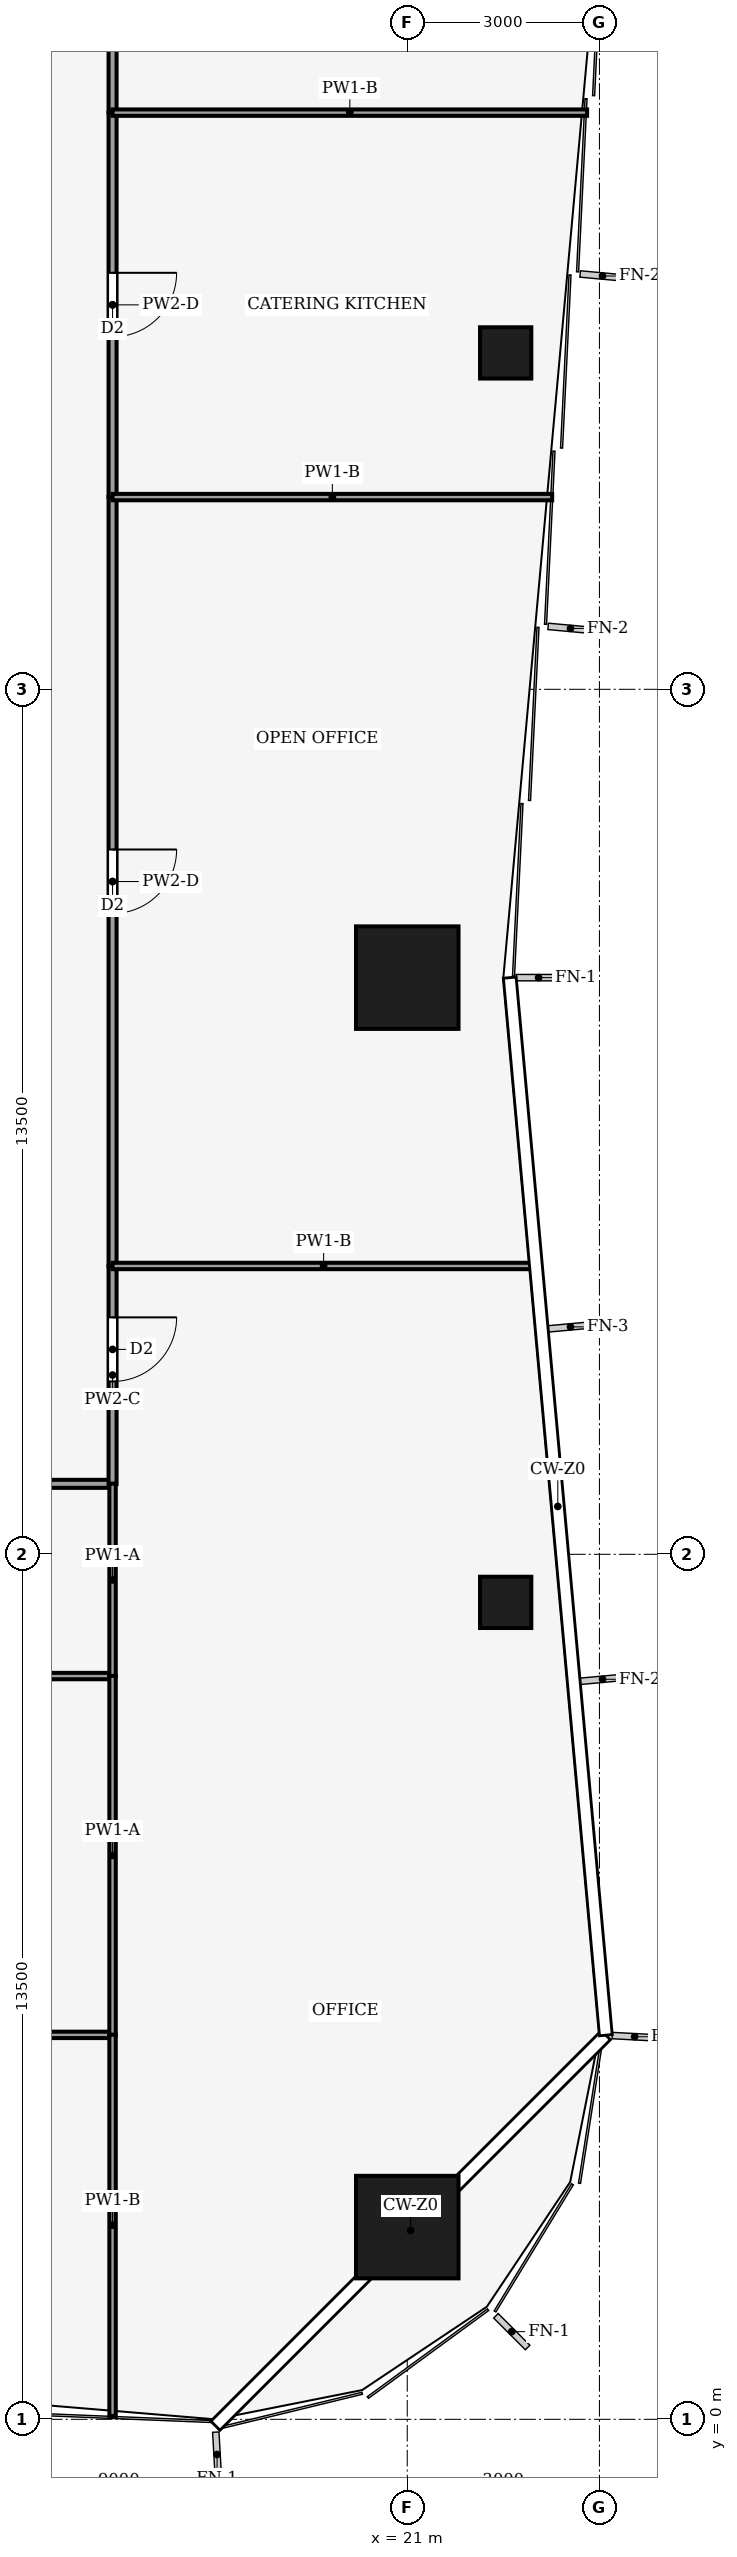
"""IFC4 building model, lengths in metres.
Left out: names, types, materials, properties, quantities, classifications, styles, units other than length and angle.
Written with IfcOpenShell. Run it as: python <this file> out.ifc"""

import sys

from ifc_helpers import new_model, si_unit, direction, frame, frame_2d, origin, origin_2d, place, context, subcontext, project, spatial, rectangle, hollow_rectangle, extrude, element, fill, save


model = new_model("IFC4")
c1 = context("Model", 3, precision=1e-05, world=origin(), true_north=direction((0.0, 1.0)))
c2 = subcontext(c1, "Body", "Model", "MODEL_VIEW")
j1 = project(units=[si_unit("LENGTHUNIT", "METRE"), si_unit("PLANEANGLEUNIT", "RADIAN")], contexts=[c1])
p1 = place(None, origin())
s1 = spatial("IfcSite", under=j1, at=p1, CompositionType="ELEMENT")
p2 = place(p1, origin())
s2 = spatial("IfcBuilding", under=s1, at=p2, CompositionType="ELEMENT")
p3 = place(p2, frame((0.0, 0.0, 9.0)))
s3 = spatial("IfcBuildingStorey", under=s2, at=p3, CompositionType="ELEMENT", Elevation=9.0)
for number, where, z_axis, x_axis in (
    (1, (21.0, 22.5, 0.0), (0.0, 0.0, 1.0), (1.0, 0.0, 0.0)),
    (2, (21.0, 3.0, 0.0), (0.0, 0.0, 1.0), (1.0, 0.0, 0.0)),
):
    element("IfcColumn", number, at=place(p3, frame(where, z_axis=z_axis, x_axis=x_axis)), inside=s3, PredefinedType="COLUMN", context=c2, shape_type="SweptSolid", body=[
        extrude(hollow_rectangle(XDim=1.6, YDim=1.6, WallThickness=0.09, at=origin_2d()), origin(), (0.0, 0.0, 1.0), 5.0),
    ])
for number, where, z_axis, x_axis in (
    (3, (22.536, 12.75, 0.0), (0.0, 0.0, 1.0), (1.0, 0.0, 0.0)),
    (4, (22.536, 32.25, 0.0), (0.0, 0.0, 1.0), (1.0, 0.0, 0.0)),
):
    element("IfcColumn", number, at=place(p3, frame(where, z_axis=z_axis, x_axis=x_axis)), inside=s3, PredefinedType="COLUMN", context=c2, shape_type="SweptSolid", body=[
        extrude(hollow_rectangle(XDim=0.8, YDim=0.8, WallThickness=0.04, at=origin_2d()), origin(), (0.0, 0.0, 1.0), 5.0),
    ])
p4 = place(p3, frame((16.4, 14.6, 0.0), z_axis=(0.0, 0.0, 1.0), x_axis=(-1.0, 0.0, 0.0)))
e5 = element("IfcWall", 5, at=p4, inside=s3, PredefinedType="PARTITIONING", context=c2, shape_type="SweptSolid", body=[
    extrude(rectangle(XDim=4.4, YDim=0.125, at=frame_2d((2.2, 0.0))), origin(), (0.0, 0.0, 1.0), 4.29),
])
p5 = place(p4, frame((1.7, 0.0, 0.0)))
e6 = element("IfcOpeningElement", 6, at=p5, cuts=e5, PredefinedType="OPENING", context=c2, shape_type="SweptSolid", body=[
    extrude(rectangle(XDim=1.0, YDim=2.1, at=frame_2d((0.5, 1.05))), frame((0.0, 0.073, 0.0), z_axis=(0.0, -1.0, 0.0), x_axis=(1.0, 0.0, 0.0)), (0.0, 0.0, 1.0), 0.145),
])
p6 = place(p3, frame((16.4, 18.0, 0.0), z_axis=(0.0, 0.0, 1.0), x_axis=(0.0, -1.0, 0.0)))
e7 = element("IfcWall", 7, at=p6, inside=s3, PredefinedType="PARTITIONING", context=c2, shape_type="SweptSolid", body=[
    extrude(rectangle(XDim=3.404, YDim=0.125, at=frame_2d((1.702, 0.0))), origin(), (0.0, 0.0, 1.0), 4.14),
])
p7 = place(p6, frame((0.802, 0.0, 0.0)))
e8 = element("IfcOpeningElement", 8, at=p7, cuts=e7, PredefinedType="OPENING", context=c2, shape_type="SweptSolid", body=[
    extrude(rectangle(XDim=1.0, YDim=2.1, at=frame_2d((0.5, 1.05))), frame((0.0, 0.073, 0.0), z_axis=(0.0, -1.0, 0.0), x_axis=(1.0, 0.0, 0.0)), (0.0, 0.0, 1.0), 0.145),
])
p8 = place(p3, frame((16.4, 30.0, 0.0), z_axis=(0.0, 0.0, 1.0), x_axis=(0.0, -1.0, 0.0)))
e9 = element("IfcWall", 9, at=p8, inside=s3, PredefinedType="PARTITIONING", context=c2, shape_type="SweptSolid", body=[
    extrude(rectangle(XDim=12.0, YDim=0.125, at=frame_2d((6.0, 0.0))), origin(), (0.0, 0.0, 1.0), 4.48),
])
p9 = place(p8, frame((5.5, 0.0, 0.0)))
e10 = element("IfcOpeningElement", 10, at=p9, cuts=e9, PredefinedType="OPENING", context=c2, shape_type="SweptSolid", body=[
    extrude(rectangle(XDim=1.0, YDim=2.1, at=frame_2d((0.5, 1.05))), frame((0.0, 0.073, 0.0), z_axis=(0.0, -1.0, 0.0), x_axis=(1.0, 0.0, 0.0)), (0.0, 0.0, 1.0), 0.145),
])
p10 = place(p3, frame((16.4, 36.0, 0.0), z_axis=(0.0, 0.0, 1.0), x_axis=(0.0, -1.0, 0.0)))
e11 = element("IfcWall", 11, at=p10, inside=s3, PredefinedType="PARTITIONING", context=c2, shape_type="SweptSolid", body=[
    extrude(rectangle(XDim=6.0, YDim=0.125, at=frame_2d((3.0, 0.0))), origin(), (0.0, 0.0, 1.0), 4.48),
])
p11 = place(p10, frame((2.5, 0.0, 0.0)))
e12 = element("IfcOpeningElement", 12, at=p11, cuts=e11, PredefinedType="OPENING", context=c2, shape_type="SweptSolid", body=[
    extrude(rectangle(XDim=1.0, YDim=2.1, at=frame_2d((0.5, 1.05))), frame((0.0, 0.073, 0.0), z_axis=(0.0, -1.0, 0.0), x_axis=(1.0, 0.0, 0.0)), (0.0, 0.0, 1.0), 0.145),
])
p12 = place(p3, frame((16.4, 41.404, 0.0), z_axis=(0.0, 0.0, 1.0), x_axis=(0.0, -1.0, 0.0)))
e13 = element("IfcWall", 13, at=p12, inside=s3, PredefinedType="PARTITIONING", context=c2, shape_type="SweptSolid", body=[
    extrude(rectangle(XDim=5.404, YDim=0.125, at=frame_2d((2.702, 0.0))), origin(), (0.0, 0.0, 1.0), 4.14),
])
p13 = place(p12, frame((2.202, 0.0, 0.0)))
e14 = element("IfcOpeningElement", 14, at=p13, cuts=e13, PredefinedType="OPENING", context=c2, shape_type="SweptSolid", body=[
    extrude(rectangle(XDim=1.0, YDim=2.1, at=frame_2d((0.5, 1.05))), frame((0.0, 0.073, 0.0), z_axis=(0.0, -1.0, 0.0), x_axis=(1.0, 0.0, 0.0)), (0.0, 0.0, 1.0), 0.145),
])
p14 = place(p3, frame((11.996, 11.6, 0.0), z_axis=(0.0, 0.0, 1.0), x_axis=(1.0, 0.0, 0.0)))
e15 = element("IfcWall", 15, at=p14, inside=s3, PredefinedType="PARTITIONING", context=c2, shape_type="SweptSolid", body=[
    extrude(rectangle(XDim=4.404, YDim=0.1, at=frame_2d((2.202, 0.0))), origin(), (0.0, 0.0, 1.0), 4.29),
])
p15 = place(p3, frame((16.4, 11.596, 0.0), z_axis=(0.0, 0.0, 1.0), x_axis=(0.0, 1.0, 0.0)))
e16 = element("IfcWall", 16, at=p15, inside=s3, PredefinedType="PARTITIONING", context=c2, shape_type="SweptSolid", body=[
    extrude(rectangle(XDim=3.008, YDim=0.1, at=frame_2d((1.504, 0.0))), origin(), (0.0, 0.0, 1.0), 4.87),
])
p16 = place(p3, frame((16.4, 6.0, 0.0), z_axis=(0.0, 0.0, 1.0), x_axis=(-1.0, 0.0, 0.0)))
e17 = element("IfcWall", 17, at=p16, inside=s3, PredefinedType="PARTITIONING", context=c2, shape_type="SweptSolid", body=[
    extrude(rectangle(XDim=10.4, YDim=0.1, at=frame_2d((5.2, 0.0))), origin(), (0.0, 0.0, 1.0), 4.29),
])
p17 = place(p16, frame((4.7, 0.0, 0.0)))
e18 = element("IfcOpeningElement", 18, at=p17, cuts=e17, PredefinedType="OPENING", context=c2, shape_type="SweptSolid", body=[
    extrude(rectangle(XDim=1.0, YDim=2.1, at=frame_2d((0.5, 1.05))), frame((0.0, 0.06, 0.0), z_axis=(0.0, -1.0, 0.0), x_axis=(1.0, 0.0, 0.0)), (0.0, 0.0, 1.0), 0.12),
])
p18 = place(p3, frame((16.4, 5.996, 0.0), z_axis=(0.0, 0.0, 1.0), x_axis=(0.0, 1.0, 0.0)))
e19 = element("IfcWall", 19, at=p18, inside=s3, PredefinedType="PARTITIONING", context=c2, shape_type="SweptSolid", body=[
    extrude(rectangle(XDim=5.608, YDim=0.1, at=frame_2d((2.804, 0.0))), origin(), (0.0, 0.0, 1.0), 4.87),
])
p19 = place(p3, frame((16.4, 0.053, 0.0), z_axis=(0.0, 0.0, 1.0), x_axis=(0.0, 1.0, 0.0)))
e20 = element("IfcWall", 20, at=p19, inside=s3, PredefinedType="PARTITIONING", context=c2, shape_type="SweptSolid", body=[
    extrude(rectangle(XDim=5.951, YDim=0.1, at=frame_2d((2.975, 0.0))), origin(), (0.0, 0.0, 1.0), 4.04),
])
p20 = place(p3, frame((22.989, 18.0, 0.0), z_axis=(0.0, 0.0, 1.0), x_axis=(-1.0, 0.0, 0.0)))
e21 = element("IfcWall", 21, at=p20, inside=s3, PredefinedType="PARTITIONING", context=c2, shape_type="SweptSolid", body=[
    extrude(rectangle(XDim=6.589, YDim=0.1, at=frame_2d((3.294, 0.0))), origin(), (0.0, 0.0, 1.0), 4.04),
])
p21 = place(p3, frame((23.262, 30.0, 0.0), z_axis=(0.0, 0.0, 1.0), x_axis=(-1.0, 0.0, 0.0)))
e22 = element("IfcWall", 22, at=p21, inside=s3, PredefinedType="PARTITIONING", context=c2, shape_type="SweptSolid", body=[
    extrude(rectangle(XDim=6.862, YDim=0.1, at=frame_2d((3.431, 0.0))), origin(), (0.0, 0.0, 1.0), 4.04),
])
p22 = place(p3, frame((23.807, 36.0, 0.0), z_axis=(0.0, 0.0, 1.0), x_axis=(-1.0, 0.0, 0.0)))
e23 = element("IfcWall", 23, at=p22, inside=s3, PredefinedType="PARTITIONING", context=c2, shape_type="SweptSolid", body=[
    extrude(rectangle(XDim=7.407, YDim=0.1, at=frame_2d((3.704, 0.0))), origin(), (0.0, 0.0, 1.0), 4.04),
])
p23 = place(p7, origin())
e24 = element("IfcDoor", 24, at=p23, inside=s3, OperationType="SINGLE_SWING_LEFT", PredefinedType="DOOR", context=c2, shape_type="SweptSolid", body=[
    extrude(rectangle(XDim=1.0, YDim=2.1, at=frame_2d((0.5, 1.05))), frame((0.0, 0.025, 0.0), z_axis=(0.0, -1.0, 0.0), x_axis=(1.0, 0.0, 0.0)), (0.0, 0.0, 1.0), 0.05),
])
fill(e8, e24)
p24 = place(p9, origin())
e25 = element("IfcDoor", 25, at=p24, inside=s3, OperationType="SINGLE_SWING_LEFT", PredefinedType="DOOR", context=c2, shape_type="SweptSolid", body=[
    extrude(rectangle(XDim=1.0, YDim=2.1, at=frame_2d((0.5, 1.05))), frame((0.0, 0.025, 0.0), z_axis=(0.0, -1.0, 0.0), x_axis=(1.0, 0.0, 0.0)), (0.0, 0.0, 1.0), 0.05),
])
fill(e10, e25)
p25 = place(p11, origin())
e26 = element("IfcDoor", 26, at=p25, inside=s3, OperationType="SINGLE_SWING_RIGHT", PredefinedType="DOOR", context=c2, shape_type="SweptSolid", body=[
    extrude(rectangle(XDim=1.0, YDim=2.1, at=frame_2d((0.5, 1.05))), frame((0.0, 0.025, 0.0), z_axis=(0.0, -1.0, 0.0), x_axis=(1.0, 0.0, 0.0)), (0.0, 0.0, 1.0), 0.05),
])
fill(e12, e26)
save(model, sys.argv[1])
